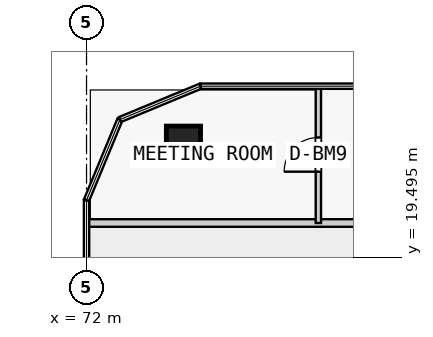
"""IFC4 building model, lengths in metres.
Left out: names, types, materials, properties, quantities, classifications, styles, units other than length and angle.
Written with IfcOpenShell. Run it as: python <this file> out.ifc"""

import sys

from ifc_helpers import new_model, si_unit, direction, frame, frame_2d, origin, origin_2d, place, context, subcontext, project, spatial, rectangle, extrude, element, fill, save


model = new_model("IFC4")
c1 = context("Model", 3, precision=1e-05, world=origin(), true_north=direction((0.0, 1.0)))
c2 = subcontext(c1, "Body", "Model", "MODEL_VIEW")
j1 = project(units=[si_unit("LENGTHUNIT", "METRE"), si_unit("PLANEANGLEUNIT", "RADIAN")], contexts=[c1])
p1 = place(None, origin())
s1 = spatial("IfcSite", under=j1, at=p1, CompositionType="ELEMENT")
p2 = place(p1, origin())
s2 = spatial("IfcBuilding", under=s1, at=p2, CompositionType="ELEMENT")
p3 = place(p2, frame((0.0, 0.0, 26.8)))
s3 = spatial("IfcBuildingStorey", under=s2, at=p3, CompositionType="ELEMENT", Elevation=26.8)
p4 = place(p3, frame((74.55, 22.5, 0.0), z_axis=(0.0, 0.0, 1.0), x_axis=(1.0, 0.0, 0.0)))
e1 = element("IfcColumn", 1, at=p4, inside=s3, PredefinedType="COLUMN", context=c2, shape_type="SweptSolid", body=[
    extrude(rectangle(XDim=0.9, YDim=0.9, at=origin_2d()), origin(), (0.0, 0.0, 1.0), 3.5),
])
p5 = place(p3, frame((72.0, 20.4, 0.0), z_axis=(0.0, 0.0, 1.0), x_axis=(1.0, 0.0, 0.0)))
e2 = element("IfcWall", 2, at=p5, inside=s3, PredefinedType="PARTITIONING", context=c2, shape_type="SweptSolid", body=[
    extrude(rectangle(XDim=20.0, YDim=0.2, at=frame_2d((10.0, 0.0))), origin(), (0.0, 0.0, 1.0), 3.25),
])
p6 = place(p3, frame((78.1, 20.4, 0.0), z_axis=(0.0, 0.0, 1.0), x_axis=(0.0, 1.0, 0.0)))
e3 = element("IfcWall", 3, at=p6, inside=s3, PredefinedType="PARTITIONING", context=c2, shape_type="SweptSolid", body=[
    extrude(rectangle(XDim=3.6, YDim=0.14, at=frame_2d((1.8, 0.0))), origin(), (0.0, 0.0, 1.0), 3.25),
])
p7 = place(p6, frame((1.35, 0.0, 0.0)))
e4 = element("IfcOpeningElement", 4, at=p7, cuts=e3, PredefinedType="OPENING", context=c2, shape_type="SweptSolid", body=[
    extrude(rectangle(XDim=0.9, YDim=2.4, at=frame_2d((0.45, 1.2))), frame((0.0, 0.08, 0.0), z_axis=(0.0, -1.0, 0.0), x_axis=(1.0, 0.0, 0.0)), (0.0, 0.0, 1.0), 0.16),
])
p8 = place(p7, origin())
e5 = element("IfcDoor", 5, at=p8, inside=s3, OperationType="SINGLE_SWING_LEFT", PredefinedType="DOOR", context=c2, shape_type="SweptSolid", body=[
    extrude(rectangle(XDim=0.9, YDim=2.4, at=frame_2d((0.45, 1.2))), frame((0.0, 0.025, 0.0), z_axis=(0.0, -1.0, 0.0), x_axis=(1.0, 0.0, 0.0)), (0.0, 0.0, 1.0), 0.05),
])
fill(e4, e5)
save(model, sys.argv[1])
